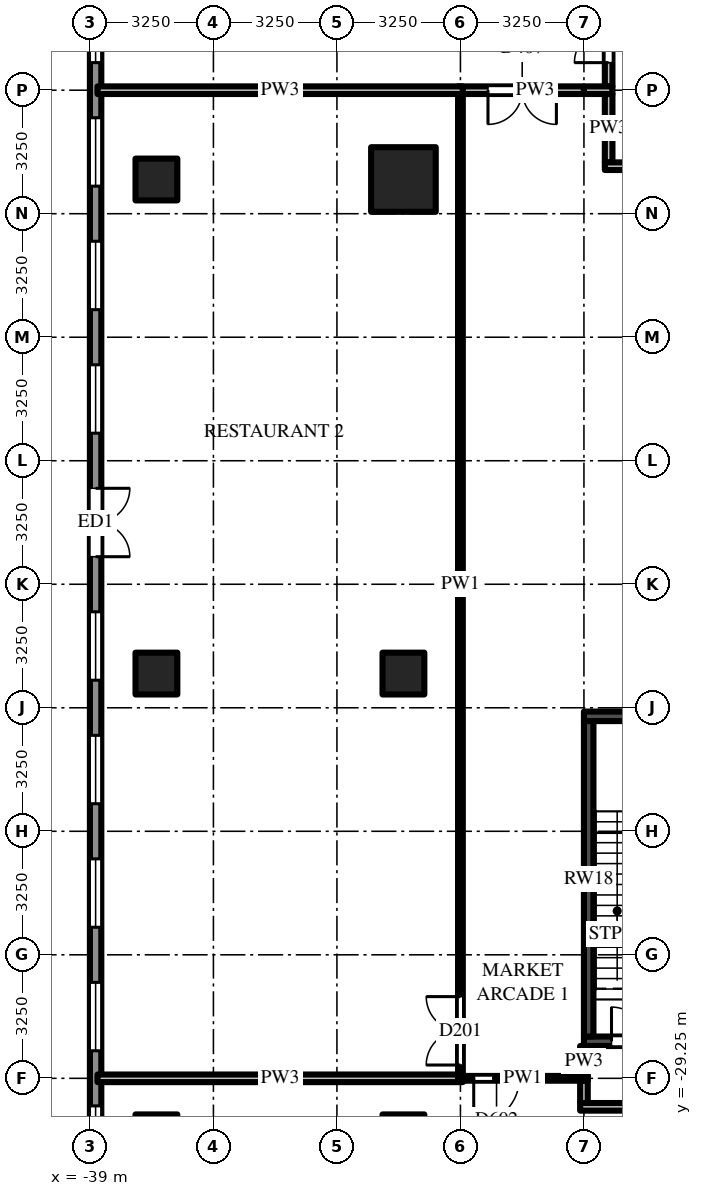
"""IFC4 building model, lengths in metres.
Left out: names, types, materials, properties, quantities, classifications, styles, units other than length and angle.
Written with IfcOpenShell. Run it as: python <this file> out.ifc"""

import sys

from ifc_helpers import new_model, si_unit, direction, frame, frame_2d, origin, origin_2d, place, context, subcontext, project, spatial, rectangle, extrude, source, transform, mapped, element, fill, save


model = new_model("IFC4")
c1 = context("Model", 3, precision=1e-05, world=origin(), true_north=direction((0.0, 1.0)))
c2 = subcontext(c1, "Body", "Model", "MODEL_VIEW")
j1 = project(units=[si_unit("LENGTHUNIT", "METRE"), si_unit("PLANEANGLEUNIT", "RADIAN")], contexts=[c1])
p1 = place(None, origin())
s1 = spatial("IfcSite", under=j1, at=p1, CompositionType="ELEMENT")
p2 = place(p1, origin())
s2 = spatial("IfcBuilding", under=s1, at=p2, CompositionType="ELEMENT")
p3 = place(p2, frame((0.0, 0.0, 14.0)))
s3 = spatial("IfcBuildingStorey", under=s2, at=p3, CompositionType="ELEMENT", Elevation=14.0)
m1 = source(origin(), c2, "Body", "SweptSolid", [
    extrude(rectangle(XDim=1.7, YDim=1.7, at=origin_2d()), origin(), (0.0, 0.0, 1.0), 5.0),
])
p4 = place(p3, frame((-30.75, -5.6, 0.0), z_axis=(0.0, 0.0, 1.0), x_axis=(1.0, 0.0, 0.0)))
e1 = element("IfcColumn", 1, at=p4, inside=s3, PredefinedType="COLUMN", context=c2, shape_type="MappedRepresentation", body=[
    mapped(m1, transform((0.0, 0.0, 0.0))),
])
m2 = source(origin(), c2, "Body", "SweptSolid", [
    extrude(rectangle(XDim=1.1, YDim=1.1, at=origin_2d()), origin(), (0.0, 0.0, 1.0), 5.0),
])
for number, where, z_axis, x_axis in (
    (2, (-30.75, -18.6, 0.0), (0.0, 0.0, 1.0), (1.0, 0.0, 0.0)),
    (3, (-30.75, -30.75, 0.0), (0.0, 0.0, 1.0), (1.0, 0.0, 0.0)),
    (4, (-37.25, -5.6, 0.0), (0.0, 0.0, 1.0), (1.0, 0.0, 0.0)),
    (5, (-37.25, -18.6, 0.0), (0.0, 0.0, 1.0), (1.0, 0.0, 0.0)),
    (6, (-37.25, -30.75, 0.0), (0.0, 0.0, 1.0), (1.0, 0.0, 0.0)),
):
    element("IfcColumn", number, at=place(p3, frame(where, z_axis=z_axis, x_axis=x_axis)), inside=s3, PredefinedType="COLUMN", context=c2, shape_type="MappedRepresentation", body=[
        mapped(m2, transform((0.0, 0.0, 0.0))),
    ])
m3 = source(origin(), c2, "Body", "SweptSolid", [
    extrude(rectangle(XDim=6.5, YDim=0.25, at=frame_2d((3.25, 0.0))), origin(), (0.0, 0.0, 1.0), 4.7),
])
p5 = place(p3, frame((-26.0, -28.275, 0.0), z_axis=(0.0, 0.0, 1.0), x_axis=(1.0, 0.0, 0.0)))
e7 = element("IfcWall", 7, at=p5, inside=s3, PredefinedType="SHEAR", context=c2, shape_type="MappedRepresentation", body=[
    mapped(m3, transform((0.0, 0.0, 0.0))),
])
m4 = source(origin(), c2, "Body", "SweptSolid", [
    extrude(rectangle(XDim=1.8, YDim=2.1, at=frame_2d((0.9, 1.05))), frame((0.0, 0.135, 0.0), z_axis=(0.0, -1.0, 0.0), x_axis=(1.0, 0.0, 0.0)), (0.0, 0.0, 1.0), 0.27),
])
p6 = place(p5, frame((0.725, 0.0, 0.0)))
e8 = element("IfcOpeningElement", 8, at=p6, cuts=e7, PredefinedType="OPENING", context=c2, shape_type="MappedRepresentation", body=[
    mapped(m4, transform((0.0, 0.0, 0.0))),
])
p7 = place(p5, frame((3.975, 0.0, 0.0)))
e9 = element("IfcOpeningElement", 9, at=p7, cuts=e7, PredefinedType="OPENING", context=c2, shape_type="MappedRepresentation", body=[
    mapped(m4, transform((0.0, 0.0, 0.0))),
])
p8 = place(p3, frame((-26.0, -19.725, 0.0), z_axis=(0.0, 0.0, 1.0), x_axis=(1.0, 0.0, 0.0)))
e10 = element("IfcWall", 10, at=p8, inside=s3, PredefinedType="SHEAR", context=c2, shape_type="MappedRepresentation", body=[
    mapped(m3, transform((0.0, 0.0, 0.0))),
])
m5 = source(origin(), c2, "Body", "SweptSolid", [
    extrude(rectangle(XDim=8.3, YDim=0.25, at=frame_2d((4.15, 0.0))), origin(), (0.0, 0.0, 1.0), 4.7),
])
p9 = place(p3, frame((-25.875, -28.15, 0.0), z_axis=(0.0, 0.0, 1.0), x_axis=(0.0, 1.0, 0.0)))
e11 = element("IfcWall", 11, at=p9, inside=s3, PredefinedType="SHEAR", context=c2, shape_type="MappedRepresentation", body=[
    mapped(m5, transform((0.0, 0.0, 0.0))),
])
m6 = source(origin(), c2, "Body", "SweptSolid", [
    extrude(rectangle(XDim=71.5, YDim=0.3, at=frame_2d((35.75, 0.0))), origin(), (0.0, 0.0, 1.0), 4.7),
])
p10 = place(p3, frame((-38.85, 35.75, 0.0), z_axis=(0.0, 0.0, 1.0), x_axis=(0.0, -1.0, 0.0)))
e12 = element("IfcWall", 12, at=p10, inside=s3, PredefinedType="SOLIDWALL", context=c2, shape_type="MappedRepresentation", body=[
    mapped(m6, transform((0.0, 0.0, 0.0))),
])
m7 = source(origin(), c2, "Body", "SweptSolid", [
    extrude(rectangle(XDim=1.8, YDim=3.0, at=frame_2d((0.9, 1.5))), frame((0.0, 0.16, 0.0), z_axis=(0.0, -1.0, 0.0), x_axis=(1.0, 0.0, 0.0)), (0.0, 0.0, 1.0), 0.32),
])
p11 = place(p10, frame((0.725, 0.0, 0.9)))
e13 = element("IfcOpeningElement", 13, at=p11, cuts=e12, PredefinedType="OPENING", context=c2, shape_type="MappedRepresentation", body=[
    mapped(m7, transform((0.0, 0.0, 0.0))),
])
p12 = place(p10, frame((3.975, 0.0, 0.9)))
e14 = element("IfcOpeningElement", 14, at=p12, cuts=e12, PredefinedType="OPENING", context=c2, shape_type="MappedRepresentation", body=[
    mapped(m7, transform((0.0, 0.0, 0.0))),
])
p13 = place(p10, frame((7.225, 0.0, 0.9)))
e15 = element("IfcOpeningElement", 15, at=p13, cuts=e12, PredefinedType="OPENING", context=c2, shape_type="MappedRepresentation", body=[
    mapped(m7, transform((0.0, 0.0, 0.0))),
])
p14 = place(p10, frame((10.475, 0.0, 0.9)))
e16 = element("IfcOpeningElement", 16, at=p14, cuts=e12, PredefinedType="OPENING", context=c2, shape_type="MappedRepresentation", body=[
    mapped(m7, transform((0.0, 0.0, 0.0))),
])
p15 = place(p10, frame((13.725, 0.0, 0.9)))
e17 = element("IfcOpeningElement", 17, at=p15, cuts=e12, PredefinedType="OPENING", context=c2, shape_type="MappedRepresentation", body=[
    mapped(m7, transform((0.0, 0.0, 0.0))),
])
p16 = place(p10, frame((16.975, 0.0, 0.9)))
e18 = element("IfcOpeningElement", 18, at=p16, cuts=e12, PredefinedType="OPENING", context=c2, shape_type="MappedRepresentation", body=[
    mapped(m7, transform((0.0, 0.0, 0.0))),
])
p17 = place(p10, frame((20.225, 0.0, 0.9)))
e19 = element("IfcOpeningElement", 19, at=p17, cuts=e12, PredefinedType="OPENING", context=c2, shape_type="MappedRepresentation", body=[
    mapped(m7, transform((0.0, 0.0, 0.0))),
])
p18 = place(p10, frame((23.475, 0.0, 0.9)))
e20 = element("IfcOpeningElement", 20, at=p18, cuts=e12, PredefinedType="OPENING", context=c2, shape_type="MappedRepresentation", body=[
    mapped(m7, transform((0.0, 0.0, 0.0))),
])
p19 = place(p10, frame((26.725, 0.0, 0.9)))
e21 = element("IfcOpeningElement", 21, at=p19, cuts=e12, PredefinedType="OPENING", context=c2, shape_type="MappedRepresentation", body=[
    mapped(m7, transform((0.0, 0.0, 0.0))),
])
p20 = place(p10, frame((29.975, 0.0, 0.9)))
e22 = element("IfcOpeningElement", 22, at=p20, cuts=e12, PredefinedType="OPENING", context=c2, shape_type="MappedRepresentation", body=[
    mapped(m7, transform((0.0, 0.0, 0.0))),
])
p21 = place(p10, frame((33.225, 0.0, 0.9)))
e23 = element("IfcOpeningElement", 23, at=p21, cuts=e12, PredefinedType="OPENING", context=c2, shape_type="MappedRepresentation", body=[
    mapped(m7, transform((0.0, 0.0, 0.0))),
])
p22 = place(p10, frame((36.475, 0.0, 0.9)))
e24 = element("IfcOpeningElement", 24, at=p22, cuts=e12, PredefinedType="OPENING", context=c2, shape_type="MappedRepresentation", body=[
    mapped(m7, transform((0.0, 0.0, 0.0))),
])
p23 = place(p10, frame((39.725, 0.0, 0.9)))
e25 = element("IfcOpeningElement", 25, at=p23, cuts=e12, PredefinedType="OPENING", context=c2, shape_type="MappedRepresentation", body=[
    mapped(m7, transform((0.0, 0.0, 0.0))),
])
p24 = place(p10, frame((42.975, 0.0, 0.9)))
e26 = element("IfcOpeningElement", 26, at=p24, cuts=e12, PredefinedType="OPENING", context=c2, shape_type="MappedRepresentation", body=[
    mapped(m7, transform((0.0, 0.0, 0.0))),
])
p25 = place(p10, frame((46.225, 0.0, 0.9)))
e27 = element("IfcOpeningElement", 27, at=p25, cuts=e12, PredefinedType="OPENING", context=c2, shape_type="MappedRepresentation", body=[
    mapped(m7, transform((0.0, 0.0, 0.0))),
])
m8 = source(origin(), c2, "Body", "SweptSolid", [
    extrude(rectangle(XDim=1.8, YDim=2.4, at=frame_2d((0.9, 1.2))), frame((0.0, 0.16, 0.0), z_axis=(0.0, -1.0, 0.0), x_axis=(1.0, 0.0, 0.0)), (0.0, 0.0, 1.0), 0.32),
])
p26 = place(p10, frame((49.475, 0.0, 0.0)))
e28 = element("IfcOpeningElement", 28, at=p26, cuts=e12, PredefinedType="OPENING", context=c2, shape_type="MappedRepresentation", body=[
    mapped(m8, transform((0.0, 0.0, 0.0))),
])
p27 = place(p10, frame((52.725, 0.0, 0.9)))
e29 = element("IfcOpeningElement", 29, at=p27, cuts=e12, PredefinedType="OPENING", context=c2, shape_type="MappedRepresentation", body=[
    mapped(m7, transform((0.0, 0.0, 0.0))),
])
p28 = place(p10, frame((55.975, 0.0, 0.9)))
e30 = element("IfcOpeningElement", 30, at=p28, cuts=e12, PredefinedType="OPENING", context=c2, shape_type="MappedRepresentation", body=[
    mapped(m7, transform((0.0, 0.0, 0.0))),
])
p29 = place(p10, frame((59.225, 0.0, 0.9)))
e31 = element("IfcOpeningElement", 31, at=p29, cuts=e12, PredefinedType="OPENING", context=c2, shape_type="MappedRepresentation", body=[
    mapped(m7, transform((0.0, 0.0, 0.0))),
])
p30 = place(p10, frame((62.475, 0.0, 0.9)))
e32 = element("IfcOpeningElement", 32, at=p30, cuts=e12, PredefinedType="OPENING", context=c2, shape_type="MappedRepresentation", body=[
    mapped(m7, transform((0.0, 0.0, 0.0))),
])
p31 = place(p10, frame((65.725, 0.0, 0.9)))
e33 = element("IfcOpeningElement", 33, at=p31, cuts=e12, PredefinedType="OPENING", context=c2, shape_type="MappedRepresentation", body=[
    mapped(m7, transform((0.0, 0.0, 0.0))),
])
p32 = place(p10, frame((68.975, 0.0, 0.9)))
e34 = element("IfcOpeningElement", 34, at=p32, cuts=e12, PredefinedType="OPENING", context=c2, shape_type="MappedRepresentation", body=[
    mapped(m7, transform((0.0, 0.0, 0.0))),
])
p33 = place(p3, frame((-29.25, -29.15, 0.0), z_axis=(0.0, 0.0, 1.0), x_axis=(0.0, 1.0, 0.0)))
e35 = element("IfcWall", 35, at=p33, inside=s3, PredefinedType="PARTITIONING", context=c2, shape_type="SweptSolid", body=[
    extrude(rectangle(XDim=25.8, YDim=0.125, at=frame_2d((12.9, 0.0))), origin(), (0.0, 0.0, 1.0), 3.762),
])
m9 = source(origin(), c2, "Body", "SweptSolid", [
    extrude(rectangle(XDim=1.8, YDim=2.1, at=frame_2d((0.9, 1.05))), frame((0.0, 0.073, 0.0), z_axis=(0.0, -1.0, 0.0), x_axis=(1.0, 0.0, 0.0)), (0.0, 0.0, 1.0), 0.145),
])
p34 = place(p33, frame((0.25, 0.0, 0.0)))
e36 = element("IfcOpeningElement", 36, at=p34, cuts=e35, PredefinedType="OPENING", context=c2, shape_type="MappedRepresentation", body=[
    mapped(m9, transform((0.0, 0.0, 0.0))),
])
m10 = source(origin(), c2, "Body", "SweptSolid", [
    extrude(rectangle(XDim=0.788, YDim=0.2, at=frame_2d((0.394, 0.0))), origin(), (0.0, 0.0, 1.0), 4.7),
])
p35 = place(p3, frame((-26.0, -29.188, 0.0), z_axis=(0.0, 0.0, 1.0), x_axis=(0.0, 1.0, 0.0)))
e37 = element("IfcWall", 37, at=p35, inside=s3, PredefinedType="PARTITIONING", context=c2, shape_type="MappedRepresentation", body=[
    mapped(m10, transform((0.0, 0.0, 0.0))),
])
m11 = source(origin(), c2, "Body", "SweptSolid", [
    extrude(rectangle(XDim=0.587, YDim=0.2, at=frame_2d((0.294, 0.0))), origin(), (0.0, 0.0, 1.0), 4.7),
])
p36 = place(p3, frame((-26.0, -29.9, 0.0), z_axis=(0.0, 0.0, 1.0), x_axis=(0.0, 1.0, 0.0)))
e38 = element("IfcWall", 38, at=p36, inside=s3, PredefinedType="PARTITIONING", context=c2, shape_type="MappedRepresentation", body=[
    mapped(m11, transform((0.0, 0.0, 0.0))),
])
m12 = source(origin(), c2, "Body", "SweptSolid", [
    extrude(rectangle(XDim=3.05, YDim=0.2, at=frame_2d((1.525, 0.0))), origin(), (0.0, 0.0, 1.0), 4.077),
])
p37 = place(p3, frame((-25.35, -3.15, 0.0), z_axis=(0.0, 0.0, 1.0), x_axis=(0.0, 1.0, 0.0)))
e39 = element("IfcWall", 39, at=p37, inside=s3, PredefinedType="PARTITIONING", context=c2, shape_type="MappedRepresentation", body=[
    mapped(m12, transform((0.0, 0.0, 0.0))),
])
m13 = source(origin(), c2, "Body", "SweptSolid", [
    extrude(rectangle(XDim=1.8, YDim=2.1, at=frame_2d((0.9, 1.05))), frame((0.0, 0.11, 0.0), z_axis=(0.0, -1.0, 0.0), x_axis=(1.0, 0.0, 0.0)), (0.0, 0.0, 1.0), 0.22),
])
p38 = place(p37, frame((0.625, 0.0, 0.0)))
e40 = element("IfcOpeningElement", 40, at=p38, cuts=e39, PredefinedType="OPENING", context=c2, shape_type="MappedRepresentation", body=[
    mapped(m13, transform((0.0, 0.0, 0.0))),
])
m14 = source(origin(), c2, "Body", "SweptSolid", [
    extrude(rectangle(XDim=1.8, YDim=0.2, at=frame_2d((0.9, 0.0))), origin(), (0.0, 0.0, 1.0), 4.7),
])
p39 = place(p3, frame((-25.35, -3.35, 0.0), z_axis=(0.0, 0.0, 1.0), x_axis=(0.0, -1.0, 0.0)))
e41 = element("IfcWall", 41, at=p39, inside=s3, PredefinedType="PARTITIONING", context=c2, shape_type="MappedRepresentation", body=[
    mapped(m14, transform((0.0, 0.0, 0.0))),
])
m15 = source(origin(), c2, "Body", "SweptSolid", [
    extrude(rectangle(XDim=8.2, YDim=0.2, at=frame_2d((4.1, 0.0))), origin(), (0.0, 0.0, 1.0), 3.762),
])
p40 = place(p3, frame((-17.9, -30.0, 0.0), z_axis=(0.0, 0.0, 1.0), x_axis=(-1.0, 0.0, 0.0)))
e42 = element("IfcWall", 42, at=p40, inside=s3, PredefinedType="PARTITIONING", context=c2, shape_type="MappedRepresentation", body=[
    mapped(m15, transform((0.0, 0.0, 0.0))),
])
m16 = source(origin(), c2, "Body", "SweptSolid", [
    extrude(rectangle(XDim=9.613, YDim=0.2, at=frame_2d((4.806, 0.0))), origin(), (0.0, 0.0, 1.0), 3.762),
])
p41 = place(p3, frame((-38.8, -29.25, 0.0), z_axis=(0.0, 0.0, 1.0), x_axis=(1.0, 0.0, 0.0)))
e43 = element("IfcWall", 43, at=p41, inside=s3, PredefinedType="PARTITIONING", context=c2, shape_type="MappedRepresentation", body=[
    mapped(m16, transform((0.0, 0.0, 0.0))),
])
m17 = source(origin(), c2, "Body", "SweptSolid", [
    extrude(rectangle(XDim=3.413, YDim=0.125, at=frame_2d((1.706, 0.0))), origin(), (0.0, 0.0, 1.0), 4.7),
])
p42 = place(p3, frame((-25.9, -29.25, 0.0), z_axis=(0.0, 0.0, 1.0), x_axis=(-1.0, 0.0, 0.0)))
e44 = element("IfcWall", 44, at=p42, inside=s3, PredefinedType="PARTITIONING", context=c2, shape_type="MappedRepresentation", body=[
    mapped(m17, transform((0.0, 0.0, 0.0))),
])
m18 = source(origin(), c2, "Body", "SweptSolid", [
    extrude(rectangle(XDim=1.2, YDim=2.1, at=frame_2d((0.6, 1.05))), frame((0.0, 0.073, 0.0), z_axis=(0.0, -1.0, 0.0), x_axis=(1.0, 0.0, 0.0)), (0.0, 0.0, 1.0), 0.145),
])
p43 = place(p42, frame((1.8, 0.0, 0.0)))
e45 = element("IfcOpeningElement", 45, at=p43, cuts=e44, PredefinedType="OPENING", context=c2, shape_type="MappedRepresentation", body=[
    mapped(m18, transform((0.0, 0.0, 0.0))),
])
m19 = source(origin(), c2, "Body", "SweptSolid", [
    extrude(rectangle(XDim=1.45, YDim=0.2, at=frame_2d((0.725, 0.0))), origin(), (0.0, 0.0, 1.0), 4.7),
])
p44 = place(p3, frame((-24.0, -5.25, 0.0), z_axis=(0.0, 0.0, 1.0), x_axis=(-1.0, 0.0, 0.0)))
e46 = element("IfcWall", 46, at=p44, inside=s3, PredefinedType="PARTITIONING", context=c2, shape_type="MappedRepresentation", body=[
    mapped(m19, transform((0.0, 0.0, 0.0))),
])
m20 = source(origin(), c2, "Body", "SweptSolid", [
    extrude(rectangle(XDim=3.312, YDim=0.2, at=frame_2d((1.656, 0.0))), origin(), (0.0, 0.0, 1.0), 4.7),
])
p45 = place(p3, frame((-26.0, -3.25, 0.0), z_axis=(0.0, 0.0, 1.0), x_axis=(-1.0, 0.0, 0.0)))
e47 = element("IfcWall", 47, at=p45, inside=s3, PredefinedType="PARTITIONING", context=c2, shape_type="MappedRepresentation", body=[
    mapped(m20, transform((0.0, 0.0, 0.0))),
])
p46 = place(p45, frame((0.725, 0.0, 0.0)))
e48 = element("IfcOpeningElement", 48, at=p46, cuts=e47, PredefinedType="OPENING", context=c2, shape_type="MappedRepresentation", body=[
    mapped(m13, transform((0.0, 0.0, 0.0))),
])
m21 = source(origin(), c2, "Body", "SweptSolid", [
    extrude(rectangle(XDim=9.613, YDim=0.2, at=frame_2d((4.806, 0.0))), origin(), (0.0, 0.0, 1.0), 3.918),
])
p47 = place(p3, frame((-29.188, -3.25, 0.0), z_axis=(0.0, 0.0, 1.0), x_axis=(-1.0, 0.0, 0.0)))
e49 = element("IfcWall", 49, at=p47, inside=s3, PredefinedType="PARTITIONING", context=c2, shape_type="MappedRepresentation", body=[
    mapped(m21, transform((0.0, 0.0, 0.0))),
])
m22 = source(origin(), c2, "Body", "SweptSolid", [
    extrude(rectangle(XDim=0.75, YDim=0.2, at=frame_2d((0.375, 0.0))), origin(), (0.0, 0.0, 1.0), 4.7),
])
p48 = place(p3, frame((-25.25, -3.25, 0.0), z_axis=(0.0, 0.0, 1.0), x_axis=(-1.0, 0.0, 0.0)))
e50 = element("IfcWall", 50, at=p48, inside=s3, PredefinedType="PARTITIONING", context=c2, shape_type="MappedRepresentation", body=[
    mapped(m22, transform((0.0, 0.0, 0.0))),
])
m23 = source(origin(), c2, "Body", "SweptSolid", [
    extrude(rectangle(XDim=1.8, YDim=2.1, at=frame_2d((0.9, 1.05))), frame((0.0, 0.025, 0.0), z_axis=(0.0, -1.0, 0.0), x_axis=(1.0, 0.0, 0.0)), (0.0, 0.0, 1.0), 0.05),
])
p49 = place(p6, origin())
e51 = element("IfcDoor", 51, at=p49, inside=s3, OperationType="DOUBLE_DOOR_SINGLE_SWING", PredefinedType="DOOR", context=c2, shape_type="MappedRepresentation", body=[
    mapped(m23, transform((0.0, 0.0, 0.0))),
])
fill(e8, e51)
m24 = source(origin(), c2, "Body", "SweptSolid", [
    extrude(rectangle(XDim=1.8, YDim=3.0, at=frame_2d((0.9, 1.5))), frame((0.0, 0.03, 0.0), z_axis=(0.0, -1.0, 0.0), x_axis=(1.0, 0.0, 0.0)), (0.0, 0.0, 1.0), 0.06),
])
p50 = place(p22, origin())
e52 = element("IfcWindow", 52, at=p50, inside=s3, PartitioningType="SINGLE_PANEL", PredefinedType="WINDOW", context=c2, shape_type="MappedRepresentation", body=[
    mapped(m24, transform((0.0, 0.0, 0.0))),
])
fill(e24, e52)
p51 = place(p23, origin())
e53 = element("IfcWindow", 53, at=p51, inside=s3, PartitioningType="SINGLE_PANEL", PredefinedType="WINDOW", context=c2, shape_type="MappedRepresentation", body=[
    mapped(m24, transform((0.0, 0.0, 0.0))),
])
fill(e25, e53)
p52 = place(p24, origin())
e54 = element("IfcWindow", 54, at=p52, inside=s3, PartitioningType="SINGLE_PANEL", PredefinedType="WINDOW", context=c2, shape_type="MappedRepresentation", body=[
    mapped(m24, transform((0.0, 0.0, 0.0))),
])
fill(e26, e54)
p53 = place(p25, origin())
e55 = element("IfcWindow", 55, at=p53, inside=s3, PartitioningType="SINGLE_PANEL", PredefinedType="WINDOW", context=c2, shape_type="MappedRepresentation", body=[
    mapped(m24, transform((0.0, 0.0, 0.0))),
])
fill(e27, e55)
m25 = source(origin(), c2, "Body", "SweptSolid", [
    extrude(rectangle(XDim=1.8, YDim=2.4, at=frame_2d((0.9, 1.2))), frame((0.0, 0.025, 0.0), z_axis=(0.0, -1.0, 0.0), x_axis=(1.0, 0.0, 0.0)), (0.0, 0.0, 1.0), 0.05),
])
p54 = place(p26, origin())
e56 = element("IfcDoor", 56, at=p54, inside=s3, OperationType="DOUBLE_DOOR_SINGLE_SWING", PredefinedType="DOOR", context=c2, shape_type="MappedRepresentation", body=[
    mapped(m25, transform((0.0, 0.0, 0.0))),
])
fill(e28, e56)
p55 = place(p27, origin())
e57 = element("IfcWindow", 57, at=p55, inside=s3, PartitioningType="SINGLE_PANEL", PredefinedType="WINDOW", context=c2, shape_type="MappedRepresentation", body=[
    mapped(m24, transform((0.0, 0.0, 0.0))),
])
fill(e29, e57)
p56 = place(p28, origin())
e58 = element("IfcWindow", 58, at=p56, inside=s3, PartitioningType="SINGLE_PANEL", PredefinedType="WINDOW", context=c2, shape_type="MappedRepresentation", body=[
    mapped(m24, transform((0.0, 0.0, 0.0))),
])
fill(e30, e58)
p57 = place(p29, origin())
e59 = element("IfcWindow", 59, at=p57, inside=s3, PartitioningType="SINGLE_PANEL", PredefinedType="WINDOW", context=c2, shape_type="MappedRepresentation", body=[
    mapped(m24, transform((0.0, 0.0, 0.0))),
])
fill(e31, e59)
p58 = place(p30, origin())
e60 = element("IfcWindow", 60, at=p58, inside=s3, PartitioningType="SINGLE_PANEL", PredefinedType="WINDOW", context=c2, shape_type="MappedRepresentation", body=[
    mapped(m24, transform((0.0, 0.0, 0.0))),
])
fill(e32, e60)
p59 = place(p31, origin())
e61 = element("IfcWindow", 61, at=p59, inside=s3, PartitioningType="SINGLE_PANEL", PredefinedType="WINDOW", context=c2, shape_type="MappedRepresentation", body=[
    mapped(m24, transform((0.0, 0.0, 0.0))),
])
fill(e33, e61)
m26 = source(origin(), c2, "Body", "SweptSolid", [
    extrude(rectangle(XDim=1.2, YDim=2.1, at=frame_2d((0.6, 1.05))), frame((0.0, 0.025, 0.0), z_axis=(0.0, -1.0, 0.0), x_axis=(1.0, 0.0, 0.0)), (0.0, 0.0, 1.0), 0.05),
])
p60 = place(p43, origin())
e62 = element("IfcDoor", 62, at=p60, inside=s3, OperationType="SINGLE_SWING_RIGHT", PredefinedType="DOOR", context=c2, shape_type="MappedRepresentation", body=[
    mapped(m26, transform((0.0, 0.0, 0.0))),
])
fill(e45, e62)
p61 = place(p34, origin())
e63 = element("IfcDoor", 63, at=p61, inside=s3, OperationType="DOUBLE_DOOR_SINGLE_SWING", PredefinedType="DOOR", context=c2, shape_type="MappedRepresentation", body=[
    mapped(m23, transform((0.0, 0.0, 0.0))),
])
fill(e36, e63)
p62 = place(p46, origin())
e64 = element("IfcDoor", 64, at=p62, inside=s3, OperationType="DOUBLE_DOOR_SINGLE_SWING", PredefinedType="DOOR", context=c2, shape_type="MappedRepresentation", body=[
    mapped(m23, transform((0.0, 0.0, 0.0))),
])
fill(e48, e64)
p63 = place(p38, origin())
e65 = element("IfcDoor", 65, at=p63, inside=s3, OperationType="DOUBLE_DOOR_SINGLE_SWING", PredefinedType="DOOR", context=c2, shape_type="MappedRepresentation", body=[
    mapped(m23, transform((0.0, 0.0, 0.0))),
])
fill(e40, e65)
save(model, sys.argv[1])
